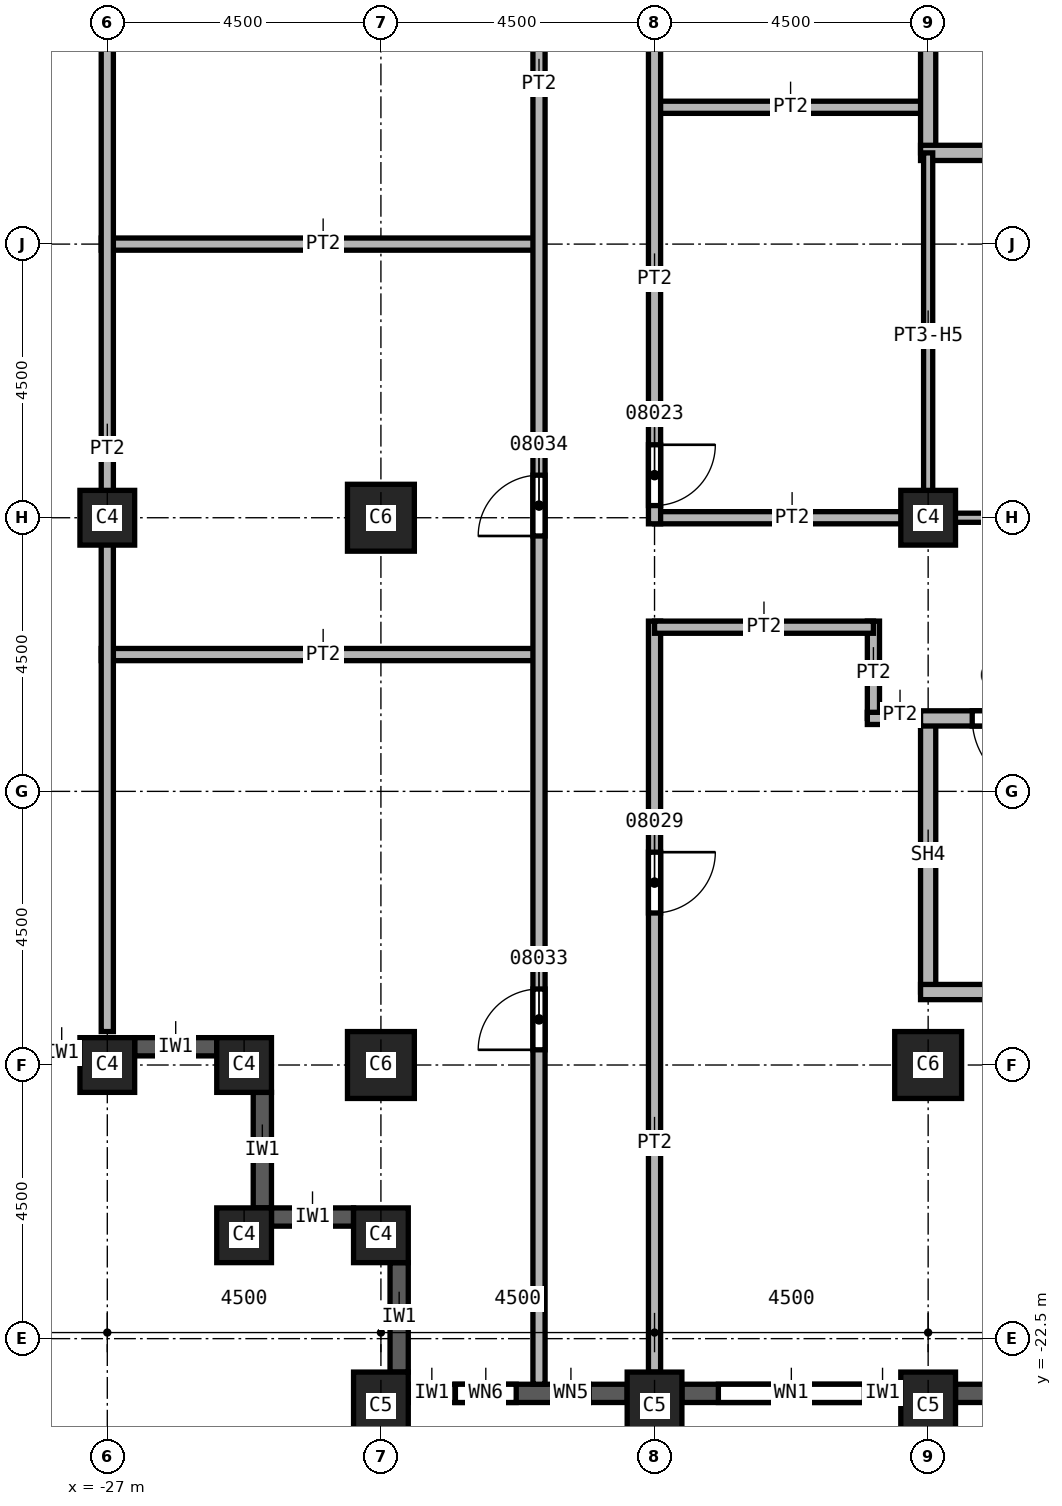
"""IFC4 building model, lengths in metres.
Left out: names, types, materials, properties, quantities, classifications, styles, units other than length and angle.
Written with IfcOpenShell. Run it as: python <this file> out.ifc"""

import sys

from ifc_helpers import new_model, si_unit, direction, frame, frame_2d, origin, origin_2d, place, context, subcontext, project, spatial, rectangle, extrude, element, fill, save


model = new_model("IFC4")
c1 = context("Model", 3, precision=1e-05, world=origin(), true_north=direction((0.0, 1.0)))
c2 = subcontext(c1, "Body", "Model", "MODEL_VIEW")
j1 = project(units=[si_unit("LENGTHUNIT", "METRE"), si_unit("PLANEANGLEUNIT", "RADIAN")], contexts=[c1])
p1 = place(None, origin())
s1 = spatial("IfcSite", under=j1, at=p1, CompositionType="ELEMENT")
p2 = place(p1, origin())
s2 = spatial("IfcBuilding", under=s1, at=p2, CompositionType="ELEMENT")
p3 = place(p2, frame((0.0, 0.0, 150.0)))
s3 = spatial("IfcBuildingStorey", under=s2, at=p3, CompositionType="ELEMENT", Elevation=150.0)
for number, where, z_axis, x_axis in (
    (1, (-13.5, -18.0, 0.0), (0.0, 0.0, 1.0), (1.0, 0.0, 0.0)),
    (2, (-22.5, -9.0, 0.0), (0.0, 0.0, 1.0), (1.0, 0.0, 0.0)),
    (3, (-22.5, -18.0, 0.0), (0.0, 0.0, 1.0), (1.0, 0.0, 0.0)),
):
    element("IfcColumn", number, at=place(p3, frame(where, z_axis=z_axis, x_axis=x_axis)), inside=s3, PredefinedType="COLUMN", context=c2, shape_type="SweptSolid", body=[
        extrude(rectangle(XDim=1.1, YDim=1.1, at=origin_2d()), origin(), (0.0, 0.0, 1.0), 3.7),
    ])
p4 = place(p3, frame((-13.5, -9.0, 0.0), z_axis=(0.0, 0.0, 1.0), x_axis=(1.0, 0.0, 0.0)))
e4 = element("IfcColumn", 4, at=p4, inside=s3, PredefinedType="COLUMN", context=c2, shape_type="SweptSolid", body=[
    extrude(rectangle(XDim=0.9, YDim=0.9, at=origin_2d()), origin(), (0.0, 0.0, 1.0), 3.7),
])
for number, where, z_axis, x_axis in (
    (5, (-13.5, -23.6, 0.0), (0.0, 0.0, 1.0), (1.0, 0.0, 0.0)),
    (6, (-18.0, -23.6, 0.0), (0.0, 0.0, 1.0), (1.0, 0.0, 0.0)),
    (7, (-22.5, -23.6, 0.0), (0.0, 0.0, 1.0), (1.0, 0.0, 0.0)),
):
    element("IfcColumn", number, at=place(p3, frame(where, z_axis=z_axis, x_axis=x_axis)), inside=s3, PredefinedType="COLUMN", context=c2, shape_type="SweptSolid", body=[
        extrude(rectangle(XDim=0.9, YDim=1.1, at=origin_2d()), origin(), (0.0, 0.0, 1.0), 3.7),
    ])
for number, where, z_axis, x_axis in (
    (8, (-27.0, -9.0, 0.0), (0.0, 0.0, 1.0), (1.0, 0.0, 0.0)),
    (9, (-27.0, -18.0, 0.0), (0.0, 0.0, 1.0), (1.0, 0.0, 0.0)),
    (10, (-22.5, -20.8, 0.0), (0.0, 0.0, 1.0), (1.0, 0.0, 0.0)),
    (11, (-24.75, -20.8, 0.0), (0.0, 0.0, 1.0), (1.0, 0.0, 0.0)),
    (12, (-24.75, -18.0, 0.0), (0.0, 0.0, 1.0), (1.0, 0.0, 0.0)),
):
    element("IfcColumn", number, at=place(p3, frame(where, z_axis=z_axis, x_axis=x_axis)), inside=s3, PredefinedType="COLUMN", context=c2, shape_type="SweptSolid", body=[
        extrude(rectangle(XDim=0.9, YDim=0.9, at=origin_2d()), origin(), (0.0, 0.0, 1.0), 3.7),
    ])
p5 = place(p3, frame((-31.05, -17.8, 0.0), z_axis=(0.0, 0.0, 1.0), x_axis=(1.0, 0.0, 0.0)))
e13 = element("IfcWall", 13, at=p5, inside=s3, PredefinedType="SOLIDWALL", context=c2, shape_type="SweptSolid", body=[
    extrude(rectangle(XDim=3.6, YDim=0.3, at=frame_2d((1.8, 0.0))), origin(), (0.0, 0.0, 1.0), 3.1),
])
p6 = place(p5, frame((0.6, 0.0, 0.8)))
e14 = element("IfcOpeningElement", 14, at=p6, cuts=e13, PredefinedType="OPENING", context=c2, shape_type="SweptSolid", body=[
    extrude(rectangle(XDim=2.4, YDim=1.95, at=frame_2d((1.2, 0.975))), frame((0.0, 0.15, 0.0), z_axis=(0.0, -1.0, 0.0), x_axis=(1.0, 0.0, 0.0)), (0.0, 0.0, 1.0), 0.3),
])
p7 = place(p3, frame((-26.55, -17.7, 0.0), z_axis=(0.0, 0.0, 1.0), x_axis=(1.0, 0.0, 0.0)))
e15 = element("IfcWall", 15, at=p7, inside=s3, PredefinedType="SOLIDWALL", context=c2, shape_type="SweptSolid", body=[
    extrude(rectangle(XDim=1.35, YDim=0.3, at=frame_2d((0.675, 0.0))), origin(), (0.0, 0.0, 1.0), 3.1),
])
p8 = place(p3, frame((-24.45, -18.45, 0.0), z_axis=(0.0, 0.0, 1.0), x_axis=(0.0, -1.0, 0.0)))
e16 = element("IfcWall", 16, at=p8, inside=s3, PredefinedType="SOLIDWALL", context=c2, shape_type="SweptSolid", body=[
    extrude(rectangle(XDim=1.9, YDim=0.3, at=frame_2d((0.95, 0.0))), origin(), (0.0, 0.0, 1.0), 3.1),
])
p9 = place(p3, frame((-24.3, -20.5, 0.0), z_axis=(0.0, 0.0, 1.0), x_axis=(1.0, 0.0, 0.0)))
e17 = element("IfcWall", 17, at=p9, inside=s3, PredefinedType="SOLIDWALL", context=c2, shape_type="SweptSolid", body=[
    extrude(rectangle(XDim=1.35, YDim=0.3, at=frame_2d((0.675, 0.0))), origin(), (0.0, 0.0, 1.0), 3.1),
])
p10 = place(p3, frame((-22.2, -21.25, 0.0), z_axis=(0.0, 0.0, 1.0), x_axis=(0.0, -1.0, 0.0)))
e18 = element("IfcWall", 18, at=p10, inside=s3, PredefinedType="SOLIDWALL", context=c2, shape_type="SweptSolid", body=[
    extrude(rectangle(XDim=1.8, YDim=0.3, at=frame_2d((0.9, 0.0))), origin(), (0.0, 0.0, 1.0), 3.1),
])
p11 = place(p3, frame((-22.05, -23.4, 0.0), z_axis=(0.0, 0.0, 1.0), x_axis=(1.0, 0.0, 0.0)))
e19 = element("IfcWall", 19, at=p11, inside=s3, PredefinedType="SOLIDWALL", context=c2, shape_type="SweptSolid", body=[
    extrude(rectangle(XDim=3.6, YDim=0.3, at=frame_2d((1.8, 0.0))), origin(), (0.0, 0.0, 1.0), 3.1),
])
p12 = place(p11, frame((0.775, 0.0, 0.8)))
e20 = element("IfcOpeningElement", 20, at=p12, cuts=e19, PredefinedType="OPENING", context=c2, shape_type="SweptSolid", body=[
    extrude(rectangle(XDim=1.0, YDim=1.95, at=frame_2d((0.5, 0.975))), frame((0.0, 0.15, 0.0), z_axis=(0.0, -1.0, 0.0), x_axis=(1.0, 0.0, 0.0)), (0.0, 0.0, 1.0), 0.3),
])
p13 = place(p11, frame((2.375, 0.0, 0.8)))
e21 = element("IfcOpeningElement", 21, at=p13, cuts=e19, PredefinedType="OPENING", context=c2, shape_type="SweptSolid", body=[
    extrude(rectangle(XDim=0.6, YDim=1.95, at=frame_2d((0.3, 0.975))), frame((0.0, 0.15, 0.0), z_axis=(0.0, -1.0, 0.0), x_axis=(1.0, 0.0, 0.0)), (0.0, 0.0, 1.0), 0.3),
])
p14 = place(p3, frame((-17.55, -23.4, 0.0), z_axis=(0.0, 0.0, 1.0), x_axis=(1.0, 0.0, 0.0)))
e22 = element("IfcWall", 22, at=p14, inside=s3, PredefinedType="SOLIDWALL", context=c2, shape_type="SweptSolid", body=[
    extrude(rectangle(XDim=3.6, YDim=0.3, at=frame_2d((1.8, 0.0))), origin(), (0.0, 0.0, 1.0), 3.1),
])
p15 = place(p14, frame((0.6, 0.0, 0.8)))
e23 = element("IfcOpeningElement", 23, at=p15, cuts=e22, PredefinedType="OPENING", context=c2, shape_type="SweptSolid", body=[
    extrude(rectangle(XDim=2.4, YDim=1.95, at=frame_2d((1.2, 0.975))), frame((0.0, 0.15, 0.0), z_axis=(0.0, -1.0, 0.0), x_axis=(1.0, 0.0, 0.0)), (0.0, 0.0, 1.0), 0.3),
])
p16 = place(p3, frame((-13.05, -23.4, 0.0), z_axis=(0.0, 0.0, 1.0), x_axis=(1.0, 0.0, 0.0)))
e24 = element("IfcWall", 24, at=p16, inside=s3, PredefinedType="SOLIDWALL", context=c2, shape_type="SweptSolid", body=[
    extrude(rectangle(XDim=3.6, YDim=0.3, at=frame_2d((1.8, 0.0))), origin(), (0.0, 0.0, 1.0), 3.1),
])
p17 = place(p16, frame((0.6, 0.0, 0.8)))
e25 = element("IfcOpeningElement", 25, at=p17, cuts=e24, PredefinedType="OPENING", context=c2, shape_type="SweptSolid", body=[
    extrude(rectangle(XDim=2.4, YDim=1.95, at=frame_2d((1.2, 0.975))), frame((0.0, 0.15, 0.0), z_axis=(0.0, -1.0, 0.0), x_axis=(1.0, 0.0, 0.0)), (0.0, 0.0, 1.0), 0.3),
])
for number, where, z_axis, x_axis in (
    (26, (-27.1, -11.25, 0.0), (0.0, 0.0, 1.0), (1.0, 0.0, 0.0)),
    (27, (-27.1, -4.5, 0.0), (0.0, 0.0, 1.0), (1.0, 0.0, 0.0)),
):
    element("IfcWall", number, at=place(p3, frame(where, z_axis=z_axis, x_axis=x_axis)), inside=s3, PredefinedType="PARTITIONING", context=c2, shape_type="SweptSolid", body=[
        extrude(rectangle(XDim=7.2, YDim=0.2, at=frame_2d((3.6, 0.0))), origin(), (0.0, 0.0, 1.0), 3.7),
    ])
p18 = place(p3, frame((-27.0, -17.45, 0.0), z_axis=(0.0, 0.0, 1.0), x_axis=(0.0, 1.0, 0.0)))
e28 = element("IfcWall", 28, at=p18, inside=s3, PredefinedType="PARTITIONING", context=c2, shape_type="SweptSolid", body=[
    extrude(rectangle(XDim=18.2, YDim=0.2, at=frame_2d((9.1, 0.0))), origin(), (0.0, 0.0, 1.0), 3.7),
])
p19 = place(p3, frame((-19.9, -23.25, 0.0), z_axis=(0.0, 0.0, 1.0), x_axis=(0.0, 1.0, 0.0)))
e29 = element("IfcWall", 29, at=p19, inside=s3, PredefinedType="PARTITIONING", context=c2, shape_type="SweptSolid", body=[
    extrude(rectangle(XDim=24.1, YDim=0.2, at=frame_2d((12.05, 0.0))), origin(), (0.0, 0.0, 1.0), 3.7),
])
p20 = place(p19, frame((5.5, 0.0, 0.0)))
e30 = element("IfcOpeningElement", 30, at=p20, cuts=e29, PredefinedType="OPENING", context=c2, shape_type="SweptSolid", body=[
    extrude(rectangle(XDim=1.0, YDim=2.1, at=frame_2d((0.5, 1.05))), frame((0.0, 0.1, 0.0), z_axis=(0.0, -1.0, 0.0), x_axis=(1.0, 0.0, 0.0)), (0.0, 0.0, 1.0), 0.2),
])
p21 = place(p19, frame((13.95, 0.0, 0.0)))
e31 = element("IfcOpeningElement", 31, at=p21, cuts=e29, PredefinedType="OPENING", context=c2, shape_type="SweptSolid", body=[
    extrude(rectangle(XDim=1.0, YDim=2.1, at=frame_2d((0.5, 1.05))), frame((0.0, 0.1, 0.0), z_axis=(0.0, -1.0, 0.0), x_axis=(1.0, 0.0, 0.0)), (0.0, 0.0, 1.0), 0.2),
])
p22 = place(p3, frame((-18.0, -10.7, 0.0), z_axis=(0.0, 0.0, 1.0), x_axis=(0.0, -1.0, 0.0)))
e32 = element("IfcWall", 32, at=p22, inside=s3, PredefinedType="PARTITIONING", context=c2, shape_type="SweptSolid", body=[
    extrude(rectangle(XDim=12.35, YDim=0.2, at=frame_2d((6.175, 0.0))), origin(), (0.0, 0.0, 1.0), 3.7),
])
p23 = place(p22, frame((3.8, 0.0, 0.0)))
e33 = element("IfcOpeningElement", 33, at=p23, cuts=e32, PredefinedType="OPENING", context=c2, shape_type="SweptSolid", body=[
    extrude(rectangle(XDim=1.0, YDim=2.1, at=frame_2d((0.5, 1.05))), frame((0.0, 0.1, 0.0), z_axis=(0.0, -1.0, 0.0), x_axis=(1.0, 0.0, 0.0)), (0.0, 0.0, 1.0), 0.2),
])
for number, where, z_axis, x_axis in (
    (34, (-18.0, -9.0, 0.0), (0.0, 0.0, 1.0), (1.0, 0.0, 0.0)),
    (35, (-18.0, -2.25, 0.0), (0.0, 0.0, 1.0), (1.0, 0.0, 0.0)),
):
    element("IfcWall", number, at=place(p3, frame(where, z_axis=z_axis, x_axis=x_axis)), inside=s3, PredefinedType="PARTITIONING", context=c2, shape_type="SweptSolid", body=[
        extrude(rectangle(XDim=4.5, YDim=0.2, at=frame_2d((2.25, 0.0))), origin(), (0.0, 0.0, 1.0), 3.7),
    ])
p24 = place(p3, frame((-18.0, 9.1, 0.0), z_axis=(0.0, 0.0, 1.0), x_axis=(0.0, -1.0, 0.0)))
e36 = element("IfcWall", 36, at=p24, inside=s3, PredefinedType="PARTITIONING", context=c2, shape_type="SweptSolid", body=[
    extrude(rectangle(XDim=18.2, YDim=0.2, at=frame_2d((9.1, 0.0))), origin(), (0.0, 0.0, 1.0), 3.7),
])
p25 = place(p24, frame((16.9, 0.0, 0.0)))
e37 = element("IfcOpeningElement", 37, at=p25, cuts=e36, PredefinedType="OPENING", context=c2, shape_type="SweptSolid", body=[
    extrude(rectangle(XDim=1.0, YDim=2.1, at=frame_2d((0.5, 1.05))), frame((0.0, 0.1, 0.0), z_axis=(0.0, -1.0, 0.0), x_axis=(1.0, 0.0, 0.0)), (0.0, 0.0, 1.0), 0.2),
])
p26 = place(p24, frame((7.0, 0.0, 0.0)))
e38 = element("IfcOpeningElement", 38, at=p26, cuts=e36, PredefinedType="OPENING", context=c2, shape_type="SweptSolid", body=[
    extrude(rectangle(XDim=1.0, YDim=2.1, at=frame_2d((0.5, 1.05))), frame((0.0, 0.1, 0.0), z_axis=(0.0, -1.0, 0.0), x_axis=(1.0, 0.0, 0.0)), (0.0, 0.0, 1.0), 0.2),
])
p27 = place(p3, frame((-14.4, -12.3, 0.0), z_axis=(0.0, 0.0, 1.0), x_axis=(0.0, 1.0, 0.0)))
e39 = element("IfcWall", 39, at=p27, inside=s3, PredefinedType="PARTITIONING", context=c2, shape_type="SweptSolid", body=[
    extrude(rectangle(XDim=1.6, YDim=0.2, at=frame_2d((0.8, 0.0))), origin(), (0.0, 0.0, 1.0), 3.7),
])
p28 = place(p3, frame((-14.4, -10.8, 0.0), z_axis=(0.0, 0.0, 1.0), x_axis=(-1.0, 0.0, 0.0)))
e40 = element("IfcWall", 40, at=p28, inside=s3, PredefinedType="PARTITIONING", context=c2, shape_type="SweptSolid", body=[
    extrude(rectangle(XDim=3.6, YDim=0.2, at=frame_2d((1.8, 0.0))), origin(), (0.0, 0.0, 1.0), 3.7),
])
p29 = place(p3, frame((-13.375, -12.3, 0.0), z_axis=(0.0, 0.0, 1.0), x_axis=(-1.0, 0.0, 0.0)))
e41 = element("IfcWall", 41, at=p29, inside=s3, PredefinedType="PARTITIONING", context=c2, shape_type="SweptSolid", body=[
    extrude(rectangle(XDim=1.125, YDim=0.2, at=frame_2d((0.562, 0.0))), origin(), (0.0, 0.0, 1.0), 3.7),
])
p30 = place(p3, frame((-13.5, -3.0, 0.0), z_axis=(0.0, 0.0, 1.0), x_axis=(0.0, 1.0, 0.0)))
e42 = element("IfcWall", 42, at=p30, inside=s3, PredefinedType="SOLIDWALL", context=c2, shape_type="SweptSolid", body=[
    extrude(rectangle(XDim=6.0, YDim=0.25, at=frame_2d((3.0, 0.0))), origin(), (0.0, 0.0, 1.0), 2.938),
])
p31 = place(p3, frame((-13.625, -3.0, 0.0), z_axis=(0.0, 0.0, 1.0), x_axis=(1.0, 0.0, 0.0)))
e43 = element("IfcWall", 43, at=p31, inside=s3, PredefinedType="SOLIDWALL", context=c2, shape_type="SweptSolid", body=[
    extrude(rectangle(XDim=9.25, YDim=0.25, at=frame_2d((4.625, 0.0))), origin(), (0.0, 0.0, 1.0), 3.7),
])
p32 = place(p31, frame((3.25, 0.0, 0.0)))
e44 = element("IfcOpeningElement", 44, at=p32, cuts=e43, PredefinedType="OPENING", context=c2, shape_type="SweptSolid", body=[
    extrude(rectangle(XDim=1.1, YDim=2.1, at=frame_2d((0.55, 1.05))), frame((0.0, 0.125, 0.0), z_axis=(0.0, -1.0, 0.0), x_axis=(1.0, 0.0, 0.0)), (0.0, 0.0, 1.0), 0.25),
])
p33 = place(p3, frame((-13.5, -16.8, 0.0), z_axis=(0.0, 0.0, 1.0), x_axis=(0.0, 1.0, 0.0)))
e45 = element("IfcWall", 45, at=p33, inside=s3, PredefinedType="SOLIDWALL", context=c2, shape_type="SweptSolid", body=[
    extrude(rectangle(XDim=4.5, YDim=0.25, at=frame_2d((2.25, 0.0))), origin(), (0.0, 0.0, 1.0), 3.7),
])
p34 = place(p3, frame((-4.5, -16.8, 0.0), z_axis=(0.0, 0.0, 1.0), x_axis=(-1.0, 0.0, 0.0)))
e46 = element("IfcWall", 46, at=p34, inside=s3, PredefinedType="SOLIDWALL", context=c2, shape_type="SweptSolid", body=[
    extrude(rectangle(XDim=9.125, YDim=0.25, at=frame_2d((4.562, 0.0))), origin(), (0.0, 0.0, 1.0), 3.7),
])
p35 = place(p3, frame((-4.375, -12.3, 0.0), z_axis=(0.0, 0.0, 1.0), x_axis=(-1.0, 0.0, 0.0)))
e47 = element("IfcWall", 47, at=p35, inside=s3, PredefinedType="SOLIDWALL", context=c2, shape_type="SweptSolid", body=[
    extrude(rectangle(XDim=9.25, YDim=0.25, at=frame_2d((4.625, 0.0))), origin(), (0.0, 0.0, 1.0), 3.7),
])
p36 = place(p35, frame((7.2, 0.0, 0.0)))
e48 = element("IfcOpeningElement", 48, at=p36, cuts=e47, PredefinedType="OPENING", context=c2, shape_type="SweptSolid", body=[
    extrude(rectangle(XDim=1.2, YDim=2.1, at=frame_2d((0.6, 1.05))), frame((0.0, 0.125, 0.0), z_axis=(0.0, -1.0, 0.0), x_axis=(1.0, 0.0, 0.0)), (0.0, 0.0, 1.0), 0.25),
])
p37 = place(p3, frame((-13.5, -9.1, 0.0), z_axis=(0.0, 0.0, 1.0), x_axis=(0.0, 1.0, 0.0)))
e49 = element("IfcWall", 49, at=p37, inside=s3, PredefinedType="PARTITIONING", context=c2, shape_type="SweptSolid", body=[
    extrude(rectangle(XDim=6.1, YDim=0.15, at=frame_2d((3.05, 0.0))), origin(), (0.0, 0.0, 1.0), 2.938),
])
p38 = place(p3, frame((-10.5, -9.0, 0.0), z_axis=(0.0, 0.0, 1.0), x_axis=(-1.0, 0.0, 0.0)))
e50 = element("IfcWall", 50, at=p38, inside=s3, PredefinedType="PARTITIONING", context=c2, shape_type="SweptSolid", body=[
    extrude(rectangle(XDim=3.075, YDim=0.15, at=frame_2d((1.538, 0.0))), origin(), (0.0, 0.0, 1.0), 2.938),
])
p39 = place(p15, origin())
e51 = element("IfcWindow", 51, at=p39, inside=s3, PartitioningType="SINGLE_PANEL", PredefinedType="WINDOW", context=c2, shape_type="SweptSolid", body=[
    extrude(rectangle(XDim=2.4, YDim=1.95, at=frame_2d((1.2, 0.975))), frame((0.0, 0.03, 0.0), z_axis=(0.0, -1.0, 0.0), x_axis=(1.0, 0.0, 0.0)), (0.0, 0.0, 1.0), 0.06),
])
fill(e23, e51)
p40 = place(p36, origin())
e52 = element("IfcDoor", 52, at=p40, inside=s3, OperationType="SINGLE_SWING_LEFT", PredefinedType="DOOR", context=c2, shape_type="SweptSolid", body=[
    extrude(rectangle(XDim=1.2, YDim=2.1, at=frame_2d((0.6, 1.05))), frame((0.0, 0.025, 0.0), z_axis=(0.0, -1.0, 0.0), x_axis=(1.0, 0.0, 0.0)), (0.0, 0.0, 1.0), 0.05),
])
fill(e48, e52)
p41 = place(p25, origin())
e53 = element("IfcDoor", 53, at=p41, inside=s3, OperationType="SINGLE_SWING_RIGHT", PredefinedType="DOOR", context=c2, shape_type="SweptSolid", body=[
    extrude(rectangle(XDim=1.0, YDim=2.1, at=frame_2d((0.5, 1.05))), frame((0.0, 0.025, 0.0), z_axis=(0.0, -1.0, 0.0), x_axis=(1.0, 0.0, 0.0)), (0.0, 0.0, 1.0), 0.05),
])
fill(e37, e53)
p42 = place(p23, origin())
e54 = element("IfcDoor", 54, at=p42, inside=s3, OperationType="SINGLE_SWING_RIGHT", PredefinedType="DOOR", context=c2, shape_type="SweptSolid", body=[
    extrude(rectangle(XDim=1.0, YDim=2.1, at=frame_2d((0.5, 1.05))), frame((0.0, 0.025, 0.0), z_axis=(0.0, -1.0, 0.0), x_axis=(1.0, 0.0, 0.0)), (0.0, 0.0, 1.0), 0.05),
])
fill(e33, e54)
p43 = place(p20, origin())
e55 = element("IfcDoor", 55, at=p43, inside=s3, OperationType="SINGLE_SWING_RIGHT", PredefinedType="DOOR", context=c2, shape_type="SweptSolid", body=[
    extrude(rectangle(XDim=1.0, YDim=2.1, at=frame_2d((0.5, 1.05))), frame((0.0, 0.025, 0.0), z_axis=(0.0, -1.0, 0.0), x_axis=(1.0, 0.0, 0.0)), (0.0, 0.0, 1.0), 0.05),
])
fill(e30, e55)
p44 = place(p21, origin())
e56 = element("IfcDoor", 56, at=p44, inside=s3, OperationType="SINGLE_SWING_LEFT", PredefinedType="DOOR", context=c2, shape_type="SweptSolid", body=[
    extrude(rectangle(XDim=1.0, YDim=2.1, at=frame_2d((0.5, 1.05))), frame((0.0, 0.025, 0.0), z_axis=(0.0, -1.0, 0.0), x_axis=(1.0, 0.0, 0.0)), (0.0, 0.0, 1.0), 0.05),
])
fill(e31, e56)
p45 = place(p12, origin())
e57 = element("IfcWindow", 57, at=p45, inside=s3, PartitioningType="SINGLE_PANEL", PredefinedType="WINDOW", context=c2, shape_type="SweptSolid", body=[
    extrude(rectangle(XDim=1.0, YDim=1.95, at=frame_2d((0.5, 0.975))), frame((0.0, 0.03, 0.0), z_axis=(0.0, -1.0, 0.0), x_axis=(1.0, 0.0, 0.0)), (0.0, 0.0, 1.0), 0.06),
])
fill(e20, e57)
p46 = place(p13, origin())
e58 = element("IfcWindow", 58, at=p46, inside=s3, PartitioningType="SINGLE_PANEL", PredefinedType="WINDOW", context=c2, shape_type="SweptSolid", body=[
    extrude(rectangle(XDim=0.6, YDim=1.95, at=frame_2d((0.3, 0.975))), frame((0.0, 0.03, 0.0), z_axis=(0.0, -1.0, 0.0), x_axis=(1.0, 0.0, 0.0)), (0.0, 0.0, 1.0), 0.06),
])
fill(e21, e58)
save(model, sys.argv[1])
